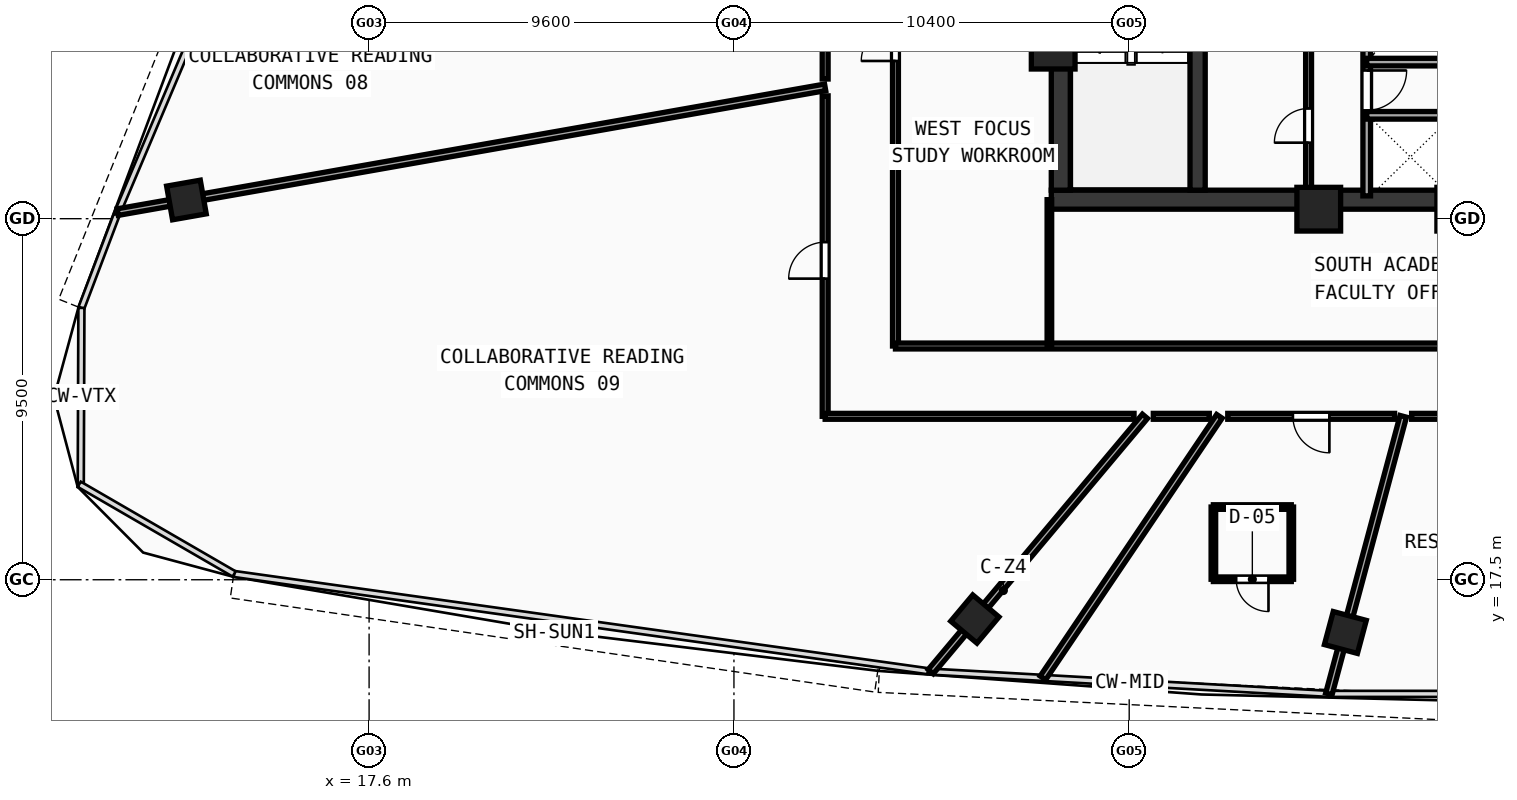
"""IFC4 building model, lengths in metres.
Left out: names, types, materials, properties, quantities, classifications, styles, units other than length and angle.
Written with IfcOpenShell. Run it as: python <this file> out.ifc"""

import sys

from ifc_helpers import new_model, si_unit, direction, frame, frame_2d, origin, origin_with_axes, origin_2d, place, context, subcontext, project, spatial, rectangle, hollow_rectangle, extrude, source, transform, mapped, element, fill, save


model = new_model("IFC4")
c1 = context("Model", 3, precision=1e-05, world=origin(), true_north=direction((0.0, 1.0)))
c2 = subcontext(c1, "Body", "Model", "MODEL_VIEW")
j1 = project(units=[si_unit("LENGTHUNIT", "METRE"), si_unit("PLANEANGLEUNIT", "RADIAN")], contexts=[c1])
p1 = place(None, origin())
s1 = spatial("IfcSite", under=j1, at=p1, CompositionType="ELEMENT")
p2 = place(p1, origin())
s2 = spatial("IfcBuilding", under=s1, at=p2, CompositionType="ELEMENT")
p3 = place(p2, frame((0.0, 0.0, 207.56)))
s3 = spatial("IfcBuildingStorey", under=s2, at=p3, CompositionType="ELEMENT", Elevation=207.56)
p4 = place(p3, frame((35.55, 27.5, 0.0), z_axis=(0.0, 0.0, 1.0), x_axis=(1.0, 0.0, 0.0)))
e1 = element("IfcWall", 1, at=p4, inside=s3, PredefinedType="SHEAR", context=c2, shape_type="SweptSolid", body=[
    extrude(rectangle(XDim=24.9, YDim=0.5, at=frame_2d((12.45, 0.0))), origin(), (0.0, 0.0, 1.0), 3.54),
])
p5 = place(p3, frame((35.8, 27.75, 0.0), z_axis=(0.0, 0.0, 1.0), x_axis=(0.0, 1.0, 0.0)))
e2 = element("IfcWall", 2, at=p5, inside=s3, PredefinedType="SHEAR", context=c2, shape_type="SweptSolid", body=[
    extrude(rectangle(XDim=12.2, YDim=0.5, at=frame_2d((6.1, 0.0))), origin(), (0.0, 0.0, 1.0), 3.54),
])
p6 = place(p3, frame((39.4, 27.75, 0.0), z_axis=(0.0, 0.0, 1.0), x_axis=(0.0, 1.0, 0.0)))
e3 = element("IfcWall", 3, at=p6, inside=s3, PredefinedType="SHEAR", context=c2, shape_type="SweptSolid", body=[
    extrude(rectangle(XDim=12.2, YDim=0.4, at=frame_2d((6.1, 0.0))), origin(), (0.0, 0.0, 1.0), 3.54),
])
p7 = place(p6, frame((10.0, 0.0, 0.0)))
e4 = element("IfcOpeningElement", 4, at=p7, cuts=e3, PredefinedType="OPENING", context=c2, shape_type="SweptSolid", body=[
    extrude(rectangle(XDim=1.1, YDim=2.1, at=frame_2d((0.55, 1.05))), frame((0.0, 0.21, 0.0), z_axis=(0.0, -1.0, 0.0), x_axis=(1.0, 0.0, 0.0)), (0.0, 0.0, 1.0), 0.42),
])
m1 = source(origin(), c2, "Body", "SweptSolid", [
    extrude(hollow_rectangle(XDim=1.15, YDim=1.15, WallThickness=0.048, at=origin_2d()), origin(), (0.0, 0.0, 1.0), 3.8),
])
for number, where, z_axis, x_axis in (
    (5, (42.588, 27.25, -0.26), (0.0, 0.0, 1.0), (1.0, 0.0, 0.0)),
    (6, (46.272, 27.25, -0.26), (0.0, 0.0, 1.0), (1.0, 0.0, 0.0)),
    (7, (35.6, 31.513, -0.26), (0.0, 0.0, 1.0), (1.0, 0.0, 0.0)),
):
    element("IfcColumn", number, at=place(p3, frame(where, z_axis=z_axis, x_axis=x_axis)), inside=s3, PredefinedType="COLUMN", context=c2, shape_type="MappedRepresentation", body=[
        mapped(m1, transform((0.0, 0.0, 0.0), scale=1.0)),
    ])
m2 = source(origin(), c2, "Body", "SweptSolid", [
    extrude(hollow_rectangle(XDim=0.9, YDim=0.9, WallThickness=0.036, at=origin_2d()), origin(), (0.0, 0.0, 1.0), 3.8),
])
for number, where, z_axis, x_axis in (
    (8, (33.539, 16.466, -0.26), (0.0, 0.0, 1.0), (0.766, -0.643, 0.0)),
    (9, (43.288, 16.112, -0.26), (0.0, 0.0, 1.0), (0.966, -0.259, 0.0)),
    (10, (12.793, 27.492, -0.26), (0.0, 0.0, 1.0), (0.174, -0.985, 0.0)),
):
    element("IfcColumn", number, at=place(p3, frame(where, z_axis=z_axis, x_axis=x_axis)), inside=s3, PredefinedType="COLUMN", context=c2, shape_type="MappedRepresentation", body=[
        mapped(m2, transform((0.0, 0.0, 0.0), scale=1.0)),
    ])
p8 = place(p3, frame((43.85, 27.6, 0.0), z_axis=(0.0, 0.0, 1.0), x_axis=(0.0, 1.0, 0.0)))
e11 = element("IfcWall", 11, at=p8, inside=s3, PredefinedType="SOLIDWALL", context=c2, shape_type="SweptSolid", body=[
    extrude(rectangle(XDim=6.22, YDim=0.2, at=frame_2d((3.11, 0.0))), origin(), (0.0, 0.0, 1.0), 3.54),
])
p9 = place(p8, frame((2.25, 0.0, 0.0)))
e12 = element("IfcOpeningElement", 12, at=p9, cuts=e11, PredefinedType="OPENING", context=c2, shape_type="SweptSolid", body=[
    extrude(rectangle(XDim=1.05, YDim=2.1, at=frame_2d((0.525, 1.05))), frame((0.0, 0.11, 0.0), z_axis=(0.0, -1.0, 0.0), x_axis=(1.0, 0.0, 0.0)), (0.0, 0.0, 1.0), 0.22),
])
p10 = place(p3, frame((43.85, 29.72, 0.0), z_axis=(0.0, 0.0, 1.0), x_axis=(1.0, 0.0, 0.0)))
e13 = element("IfcWall", 13, at=p10, inside=s3, PredefinedType="SOLIDWALL", context=c2, shape_type="SweptSolid", body=[
    extrude(rectangle(XDim=7.2, YDim=0.2, at=frame_2d((3.6, 0.0))), origin(), (0.0, 0.0, 1.0), 3.54),
])
p11 = place(p3, frame((43.85, 31.12, 0.0), z_axis=(0.0, 0.0, 1.0), x_axis=(1.0, 0.0, 0.0)))
e14 = element("IfcWall", 14, at=p11, inside=s3, PredefinedType="SOLIDWALL", context=c2, shape_type="SweptSolid", body=[
    extrude(rectangle(XDim=9.83, YDim=0.2, at=frame_2d((4.915, 0.0))), origin(), (0.0, 0.0, 1.0), 3.54),
])
p12 = place(p3, frame((42.32, 27.6, 0.0), z_axis=(0.0, 0.0, 1.0), x_axis=(0.0, 1.0, 0.0)))
e15 = element("IfcWall", 15, at=p12, inside=s3, PredefinedType="PARTITIONING", context=c2, shape_type="SweptSolid", body=[
    extrude(rectangle(XDim=5.9, YDim=0.155, at=frame_2d((2.95, 0.0))), origin(), (0.0, 0.0, 1.0), 3.54),
])
p13 = place(p12, frame((1.4, 0.0, 0.0)))
e16 = element("IfcOpeningElement", 16, at=p13, cuts=e15, PredefinedType="OPENING", context=c2, shape_type="SweptSolid", body=[
    extrude(rectangle(XDim=0.9, YDim=2.1, at=frame_2d((0.45, 1.05))), frame((0.0, 0.087, 0.0), z_axis=(0.0, -1.0, 0.0), x_axis=(1.0, 0.0, 0.0)), (0.0, 0.0, 1.0), 0.175),
])
p14 = place(p12, frame((4.45, 0.0, 0.0)))
e17 = element("IfcOpeningElement", 17, at=p14, cuts=e15, PredefinedType="OPENING", context=c2, shape_type="SweptSolid", body=[
    extrude(rectangle(XDim=0.9, YDim=2.1, at=frame_2d((0.45, 1.05))), frame((0.0, 0.087, 0.0), z_axis=(0.0, -1.0, 0.0), x_axis=(1.0, 0.0, 0.0)), (0.0, 0.0, 1.0), 0.175),
])
p15 = place(p3, frame((31.45, 23.65, 0.0), z_axis=(0.0, 0.0, 1.0), x_axis=(0.0, 1.0, 0.0)))
e18 = element("IfcWall", 18, at=p15, inside=s3, PredefinedType="PARTITIONING", context=c2, shape_type="SweptSolid", body=[
    extrude(rectangle(XDim=16.6, YDim=0.155, at=frame_2d((8.3, 0.0))), origin(), (0.0, 0.0, 1.0), 2.89),
])
p16 = place(p15, frame((7.5, 0.0, 0.0)))
e19 = element("IfcOpeningElement", 19, at=p16, cuts=e18, PredefinedType="OPENING", context=c2, shape_type="SweptSolid", body=[
    extrude(rectangle(XDim=0.9, YDim=2.08, at=frame_2d((0.45, 1.04))), frame((0.0, 0.087, 0.0), z_axis=(0.0, -1.0, 0.0), x_axis=(1.0, 0.0, 0.0)), (0.0, 0.0, 1.0), 0.175),
])
p17 = place(p3, frame((31.45, 23.65, 0.0), z_axis=(0.0, 0.0, 1.0), x_axis=(1.0, 0.0, 0.0)))
e20 = element("IfcWall", 20, at=p17, inside=s3, PredefinedType="PARTITIONING", context=c2, shape_type="SweptSolid", body=[
    extrude(rectangle(XDim=33.1, YDim=0.155, at=frame_2d((16.55, 0.0))), origin(), (0.0, 0.0, 1.0), 2.89),
])
p18 = place(p17, frame((16.0, 0.0, 0.0)))
e21 = element("IfcOpeningElement", 21, at=p18, cuts=e20, PredefinedType="OPENING", context=c2, shape_type="SweptSolid", body=[
    extrude(rectangle(XDim=0.92, YDim=2.1, at=frame_2d((0.46, 1.05))), frame((0.0, 0.087, 0.0), z_axis=(0.0, -1.0, 0.0), x_axis=(1.0, 0.0, 0.0)), (0.0, 0.0, 1.0), 0.175),
])
p19 = place(p3, frame((35.5, 23.65, 0.0), z_axis=(0.0, 0.0, 1.0), x_axis=(0.0, 1.0, 0.0)))
e22 = element("IfcWall", 22, at=p19, inside=s3, PredefinedType="PARTITIONING", context=c2, shape_type="SweptSolid", body=[
    extrude(rectangle(XDim=3.85, YDim=0.12, at=frame_2d((1.925, 0.0))), origin(), (0.0, 0.0, 1.0), 3.14),
])
p20 = place(p3, frame((29.6, 30.456, 0.0), z_axis=(0.0, 0.0, 1.0), x_axis=(-0.984807864876, -0.173647543254, 0.0)))
e23 = element("IfcWall", 23, at=p20, inside=s3, PredefinedType="PARTITIONING", context=c2, shape_type="SweptSolid", body=[
    extrude(rectangle(XDim=18.902, YDim=0.175, at=frame_2d((9.451, 0.0))), origin(), (0.0, 0.0, 1.0), 2.89),
])
p21 = place(p3, frame((38.015, 21.8, 0.0), z_axis=(0.0, 0.0, 1.0), x_axis=(-0.642774108653, -0.766055771629, 0.0)))
e24 = element("IfcWall", 24, at=p21, inside=s3, PredefinedType="PARTITIONING", context=c2, shape_type="SweptSolid", body=[
    extrude(rectangle(XDim=8.769, YDim=0.175, at=frame_2d((4.385, 0.0))), origin(), (0.0, 0.0, 1.0), 2.89),
])
p22 = place(p3, frame((39.973, 21.8, 0.0), z_axis=(0.0, 0.0, 1.0), x_axis=(-0.559191496738, -0.829038521406, 0.0)))
e25 = element("IfcWall", 25, at=p22, inside=s3, PredefinedType="PARTITIONING", context=c2, shape_type="SweptSolid", body=[
    extrude(rectangle(XDim=8.302, YDim=0.175, at=frame_2d((4.151, 0.0))), origin(), (0.0, 0.0, 1.0), 2.89),
])
p23 = place(p3, frame((44.811, 21.8, 0.0), z_axis=(0.0, 0.0, 1.0), x_axis=(-0.25880602585, -0.965929314693, 0.0)))
e26 = element("IfcWall", 26, at=p23, inside=s3, PredefinedType="PARTITIONING", context=c2, shape_type="SweptSolid", body=[
    extrude(rectangle(XDim=7.561, YDim=0.175, at=frame_2d((3.78, 0.0))), origin(), (0.0, 0.0, 1.0), 2.89),
])
p24 = place(p3, frame((29.6, 21.8, 0.0), z_axis=(0.0, 0.0, 1.0), x_axis=(0.0, 1.0, 0.0)))
e27 = element("IfcWall", 27, at=p24, inside=s3, PredefinedType="PARTITIONING", context=c2, shape_type="SweptSolid", body=[
    extrude(rectangle(XDim=8.432, YDim=0.155, at=frame_2d((4.216, 0.0))), origin(), (0.0, 0.0, 1.0), 3.14),
])
p25 = place(p24, frame((3.623, 0.0, 0.0)))
e28 = element("IfcOpeningElement", 28, at=p25, cuts=e27, PredefinedType="OPENING", context=c2, shape_type="SweptSolid", body=[
    extrude(rectangle(XDim=0.96, YDim=2.12, at=frame_2d((0.48, 1.06))), frame((0.0, 0.087, 0.0), z_axis=(0.0, -1.0, 0.0), x_axis=(1.0, 0.0, 0.0)), (0.0, 0.0, 1.0), 0.175),
])
p26 = place(p3, frame((29.6, 30.675, 0.0), z_axis=(0.0, 0.0, 1.0), x_axis=(0.0, 1.0, 0.0)))
e29 = element("IfcWall", 29, at=p26, inside=s3, PredefinedType="PARTITIONING", context=c2, shape_type="SweptSolid", body=[
    extrude(rectangle(XDim=2.805, YDim=0.155, at=frame_2d((1.402, 0.0))), origin(), (0.0, 0.0, 1.0), 3.54),
])
p27 = place(p26, frame((0.927, 0.0, 0.0)))
e30 = element("IfcOpeningElement", 30, at=p27, cuts=e29, PredefinedType="OPENING", context=c2, shape_type="SweptSolid", body=[
    extrude(rectangle(XDim=0.96, YDim=2.12, at=frame_2d((0.48, 1.06))), frame((0.0, 0.087, 0.0), z_axis=(0.0, -1.0, 0.0), x_axis=(1.0, 0.0, 0.0)), (0.0, 0.0, 1.0), 0.175),
])
p28 = place(p3, frame((57.765, 21.8, 0.0), z_axis=(0.0, 0.0, 1.0), x_axis=(-1.0, 0.0, 0.0)))
e31 = element("IfcWall", 31, at=p28, inside=s3, PredefinedType="PARTITIONING", context=c2, shape_type="SweptSolid", body=[
    extrude(rectangle(XDim=12.734, YDim=0.155, at=frame_2d((6.367, 0.0))), origin(), (0.0, 0.0, 1.0), 2.89),
])
p29 = place(p28, frame((5.892, 0.0, 0.0)))
e32 = element("IfcOpeningElement", 32, at=p29, cuts=e31, PredefinedType="OPENING", context=c2, shape_type="SweptSolid", body=[
    extrude(rectangle(XDim=0.96, YDim=2.12, at=frame_2d((0.48, 1.06))), frame((0.0, 0.087, 0.0), z_axis=(0.0, -1.0, 0.0), x_axis=(1.0, 0.0, 0.0)), (0.0, 0.0, 1.0), 0.175),
])
p30 = place(p3, frame((44.583, 21.8, 0.0), z_axis=(0.0, 0.0, 1.0), x_axis=(-1.0, 0.0, 0.0)))
e33 = element("IfcWall", 33, at=p30, inside=s3, PredefinedType="PARTITIONING", context=c2, shape_type="SweptSolid", body=[
    extrude(rectangle(XDim=4.39, YDim=0.155, at=frame_2d((2.195, 0.0))), origin(), (0.0, 0.0, 1.0), 3.54),
])
p31 = place(p30, frame((1.716, 0.0, 0.0)))
e34 = element("IfcOpeningElement", 34, at=p31, cuts=e33, PredefinedType="OPENING", context=c2, shape_type="SweptSolid", body=[
    extrude(rectangle(XDim=0.96, YDim=2.12, at=frame_2d((0.48, 1.06))), frame((0.0, 0.087, 0.0), z_axis=(0.0, -1.0, 0.0), x_axis=(1.0, 0.0, 0.0)), (0.0, 0.0, 1.0), 0.175),
])
p32 = place(p3, frame((39.708, 21.8, 0.0), z_axis=(0.0, 0.0, 1.0), x_axis=(-1.0, 0.0, 0.0)))
e35 = element("IfcWall", 35, at=p32, inside=s3, PredefinedType="PARTITIONING", context=c2, shape_type="SweptSolid", body=[
    extrude(rectangle(XDim=1.473, YDim=0.155, at=frame_2d((0.737, 0.0))), origin(), (0.0, 0.0, 1.0), 2.89),
])
p33 = place(p3, frame((37.728, 21.8, 0.0), z_axis=(0.0, 0.0, 1.0), x_axis=(-1.0, 0.0, 0.0)))
e36 = element("IfcWall", 36, at=p33, inside=s3, PredefinedType="PARTITIONING", context=c2, shape_type="SweptSolid", body=[
    extrude(rectangle(XDim=8.127, YDim=0.155, at=frame_2d((4.064, 0.0))), origin(), (0.0, 0.0, 1.0), 3.14),
])
p34 = place(p3, frame((39.815, 17.513, 0.0), z_axis=(0.0, 0.0, 1.0), x_axis=(1.0, 0.0, 0.0)))
e37 = element("IfcWall", 37, at=p34, inside=s3, PredefinedType="PARTITIONING", context=c2, shape_type="SweptSolid", body=[
    extrude(rectangle(XDim=2.05, YDim=0.12, at=frame_2d((1.025, 0.0))), origin(), (0.0, 0.0, 1.0), 3.54),
])
p35 = place(p34, frame((0.6, 0.0, 0.0)))
e38 = element("IfcOpeningElement", 38, at=p35, cuts=e37, PredefinedType="OPENING", context=c2, shape_type="SweptSolid", body=[
    extrude(rectangle(XDim=0.85, YDim=2.1, at=frame_2d((0.425, 1.05))), frame((0.0, 0.07, 0.0), z_axis=(0.0, -1.0, 0.0), x_axis=(1.0, 0.0, 0.0)), (0.0, 0.0, 1.0), 0.14),
])
p36 = place(p3, frame((41.865, 17.513, 0.0), z_axis=(0.0, 0.0, 1.0), x_axis=(0.0, 1.0, 0.0)))
e39 = element("IfcWall", 39, at=p36, inside=s3, PredefinedType="PARTITIONING", context=c2, shape_type="SweptSolid", body=[
    extrude(rectangle(XDim=1.9, YDim=0.12, at=frame_2d((0.95, 0.0))), origin(), (0.0, 0.0, 1.0), 3.54),
])
p37 = place(p3, frame((41.865, 19.413, 0.0), z_axis=(0.0, 0.0, 1.0), x_axis=(-1.0, 0.0, 0.0)))
e40 = element("IfcWall", 40, at=p37, inside=s3, PredefinedType="PARTITIONING", context=c2, shape_type="SweptSolid", body=[
    extrude(rectangle(XDim=2.05, YDim=0.12, at=frame_2d((1.025, 0.0))), origin(), (0.0, 0.0, 1.0), 3.54),
])
p38 = place(p3, frame((39.815, 19.413, 0.0), z_axis=(0.0, 0.0, 1.0), x_axis=(0.0, -1.0, 0.0)))
e41 = element("IfcWall", 41, at=p38, inside=s3, PredefinedType="PARTITIONING", context=c2, shape_type="SweptSolid", body=[
    extrude(rectangle(XDim=1.9, YDim=0.12, at=frame_2d((0.95, 0.0))), origin(), (0.0, 0.0, 1.0), 3.54),
])
m3 = source(origin(), c2, "Body", "SweptSolid", [
    extrude(rectangle(XDim=1.05, YDim=2.1, at=frame_2d((0.525, 1.05))), frame((0.0, 0.025, 0.0), z_axis=(0.0, -1.0, 0.0), x_axis=(1.0, 0.0, 0.0)), (0.0, 0.0, 1.0), 0.05),
])
p39 = place(p9, frame((1.05, 0.0, 0.0), z_axis=(0.0, 0.0, 1.0), x_axis=(-1.0, 0.0, 0.0)))
e42 = element("IfcDoor", 42, at=p39, inside=s3, OperationType="SINGLE_SWING_LEFT", PredefinedType="DOOR", context=c2, shape_type="MappedRepresentation", body=[
    mapped(m3, transform((0.0, 0.0, 0.0), scale=1.0)),
])
fill(e12, e42)
m4 = source(origin(), c2, "Body", "SweptSolid", [
    extrude(rectangle(XDim=0.9, YDim=2.1, at=frame_2d((0.45, 1.05))), frame((0.0, 0.025, 0.0), z_axis=(0.0, -1.0, 0.0), x_axis=(1.0, 0.0, 0.0)), (0.0, 0.0, 1.0), 0.05),
])
p40 = place(p13, origin_with_axes())
e43 = element("IfcDoor", 43, at=p40, inside=s3, OperationType="SINGLE_SWING_LEFT", PredefinedType="DOOR", context=c2, shape_type="MappedRepresentation", body=[
    mapped(m4, transform((0.0, 0.0, 0.0), scale=1.0)),
])
fill(e16, e43)
m5 = source(origin(), c2, "Body", "SweptSolid", [
    extrude(rectangle(XDim=0.9, YDim=2.08, at=frame_2d((0.45, 1.04))), frame((0.0, 0.025, 0.0), z_axis=(0.0, -1.0, 0.0), x_axis=(1.0, 0.0, 0.0)), (0.0, 0.0, 1.0), 0.05),
])
p41 = place(p16, origin_with_axes())
e44 = element("IfcDoor", 44, at=p41, inside=s3, OperationType="SINGLE_SWING_LEFT", PredefinedType="DOOR", context=c2, shape_type="MappedRepresentation", body=[
    mapped(m5, transform((0.0, 0.0, 0.0), scale=1.0)),
])
fill(e19, e44)
m6 = source(origin(), c2, "Body", "SweptSolid", [
    extrude(rectangle(XDim=0.96, YDim=2.12, at=frame_2d((0.48, 1.06))), frame((0.0, 0.025, 0.0), z_axis=(0.0, -1.0, 0.0), x_axis=(1.0, 0.0, 0.0)), (0.0, 0.0, 1.0), 0.05),
])
p42 = place(p25, origin_with_axes())
e45 = element("IfcDoor", 45, at=p42, inside=s3, OperationType="SINGLE_SWING_LEFT", PredefinedType="DOOR", context=c2, shape_type="MappedRepresentation", body=[
    mapped(m6, transform((0.0, 0.0, 0.0), scale=1.0)),
])
fill(e28, e45)
p43 = place(p31, origin_with_axes())
e46 = element("IfcDoor", 46, at=p43, inside=s3, OperationType="SINGLE_SWING_LEFT", PredefinedType="DOOR", context=c2, shape_type="MappedRepresentation", body=[
    mapped(m6, transform((0.0, 0.0, 0.0), scale=1.0)),
])
fill(e34, e46)
m7 = source(origin(), c2, "Body", "SweptSolid", [
    extrude(rectangle(XDim=0.85, YDim=2.1, at=frame_2d((0.425, 1.05))), frame((0.0, 0.025, 0.0), z_axis=(0.0, -1.0, 0.0), x_axis=(1.0, 0.0, 0.0)), (0.0, 0.0, 1.0), 0.05),
])
p44 = place(p35, frame((0.85, 0.0, 0.0), z_axis=(0.0, 0.0, 1.0), x_axis=(-1.0, 0.0, 0.0)))
e47 = element("IfcDoor", 47, at=p44, inside=s3, OperationType="SINGLE_SWING_LEFT", PredefinedType="DOOR", context=c2, shape_type="MappedRepresentation", body=[
    mapped(m7, transform((0.0, 0.0, 0.0), scale=1.0)),
])
fill(e38, e47)
save(model, sys.argv[1])
